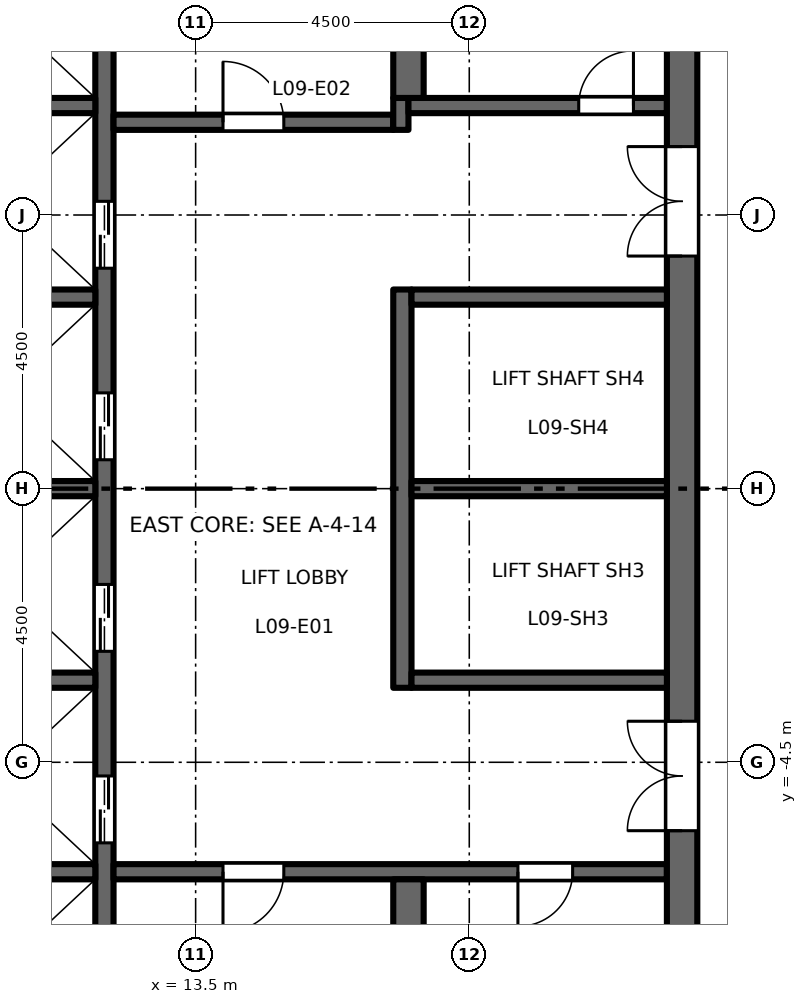
"""IFC4 building model, lengths in metres.
Left out: names, types, materials, properties, quantities, classifications, styles, units other than length and angle.
Written with IfcOpenShell. Run it as: python <this file> out.ifc"""

import sys

from ifc_helpers import new_model, si_unit, direction, frame, frame_2d, origin, place, context, subcontext, project, spatial, rectangle, extrude, element, fill, save


model = new_model("IFC4")
c1 = context("Model", 3, precision=1e-05, world=origin(), true_north=direction((0.0, 1.0)))
c2 = subcontext(c1, "Body", "Model", "MODEL_VIEW")
j1 = project(units=[si_unit("LENGTHUNIT", "METRE"), si_unit("PLANEANGLEUNIT", "RADIAN")], contexts=[c1])
p1 = place(None, origin())
s1 = spatial("IfcSite", under=j1, at=p1, CompositionType="ELEMENT")
p2 = place(p1, origin())
s2 = spatial("IfcBuilding", under=s1, at=p2, CompositionType="ELEMENT")
p3 = place(p2, frame((0.0, 0.0, 44.7)))
s3 = spatial("IfcBuildingStorey", under=s2, at=p3, CompositionType="ELEMENT", Elevation=44.7)
p4 = place(p3, frame((12.0, -9.45, 0.0), z_axis=(0.0, 0.0, 1.0), x_axis=(0.0, 1.0, 0.0)))
e1 = element("IfcWall", 1, at=p4, inside=s3, PredefinedType="SHEAR", context=c2, shape_type="SweptSolid", body=[
    extrude(rectangle(XDim=18.9, YDim=0.3, at=frame_2d((9.45, 0.0))), origin(), (0.0, 0.0, 1.0), 4.35),
])
p5 = place(p4, frame((3.625, 0.0, 0.0)))
e2 = element("IfcOpeningElement", 2, at=p5, cuts=e1, PredefinedType="OPENING", context=c2, shape_type="SweptSolid", body=[
    extrude(rectangle(XDim=1.1, YDim=2.1, at=frame_2d((0.55, 1.05))), frame((0.0, 0.16, 0.0), z_axis=(0.0, -1.0, 0.0), x_axis=(1.0, 0.0, 0.0)), (0.0, 0.0, 1.0), 0.32),
])
p6 = place(p4, frame((6.775, 0.0, 0.0)))
e3 = element("IfcOpeningElement", 3, at=p6, cuts=e1, PredefinedType="OPENING", context=c2, shape_type="SweptSolid", body=[
    extrude(rectangle(XDim=1.1, YDim=2.1, at=frame_2d((0.55, 1.05))), frame((0.0, 0.16, 0.0), z_axis=(0.0, -1.0, 0.0), x_axis=(1.0, 0.0, 0.0)), (0.0, 0.0, 1.0), 0.32),
])
p7 = place(p4, frame((9.925, 0.0, 0.0)))
e4 = element("IfcOpeningElement", 4, at=p7, cuts=e1, PredefinedType="OPENING", context=c2, shape_type="SweptSolid", body=[
    extrude(rectangle(XDim=1.1, YDim=2.1, at=frame_2d((0.55, 1.05))), frame((0.0, 0.16, 0.0), z_axis=(0.0, -1.0, 0.0), x_axis=(1.0, 0.0, 0.0)), (0.0, 0.0, 1.0), 0.32),
])
p8 = place(p4, frame((13.075, 0.0, 0.0)))
e5 = element("IfcOpeningElement", 5, at=p8, cuts=e1, PredefinedType="OPENING", context=c2, shape_type="SweptSolid", body=[
    extrude(rectangle(XDim=1.1, YDim=2.1, at=frame_2d((0.55, 1.05))), frame((0.0, 0.16, 0.0), z_axis=(0.0, -1.0, 0.0), x_axis=(1.0, 0.0, 0.0)), (0.0, 0.0, 1.0), 0.32),
])
p9 = place(p4, frame((16.725, 0.0, 0.0)))
e6 = element("IfcOpeningElement", 6, at=p9, cuts=e1, PredefinedType="OPENING", context=c2, shape_type="SweptSolid", body=[
    extrude(rectangle(XDim=1.2, YDim=2.1, at=frame_2d((0.6, 1.05))), frame((0.0, 0.16, 0.0), z_axis=(0.0, -1.0, 0.0), x_axis=(1.0, 0.0, 0.0)), (0.0, 0.0, 1.0), 0.32),
])
p10 = place(p4, frame((0.975, 0.0, 0.0)))
e7 = element("IfcOpeningElement", 7, at=p10, cuts=e1, PredefinedType="OPENING", context=c2, shape_type="SweptSolid", body=[
    extrude(rectangle(XDim=1.2, YDim=2.1, at=frame_2d((0.6, 1.05))), frame((0.0, 0.16, 0.0), z_axis=(0.0, -1.0, 0.0), x_axis=(1.0, 0.0, 0.0)), (0.0, 0.0, 1.0), 0.32),
])
p11 = place(p3, frame((12.15, 6.025, 0.0), z_axis=(0.0, 0.0, 1.0), x_axis=(1.0, 0.0, 0.0)))
e8 = element("IfcWall", 8, at=p11, inside=s3, PredefinedType="SHEAR", context=c2, shape_type="SweptSolid", body=[
    extrude(rectangle(XDim=4.6, YDim=0.25, at=frame_2d((2.3, 0.0))), origin(), (0.0, 0.0, 1.0), 4.35),
])
p12 = place(p11, frame((1.8, 0.0, 0.0)))
e9 = element("IfcOpeningElement", 9, at=p12, cuts=e8, PredefinedType="OPENING", context=c2, shape_type="SweptSolid", body=[
    extrude(rectangle(XDim=1.0, YDim=2.1, at=frame_2d((0.5, 1.05))), frame((0.0, 0.135, 0.0), z_axis=(0.0, -1.0, 0.0), x_axis=(1.0, 0.0, 0.0)), (0.0, 0.0, 1.0), 0.27),
])
p13 = place(p3, frame((16.875, 5.9, 0.0), z_axis=(0.0, 0.0, 1.0), x_axis=(0.0, 1.0, 0.0)))
e10 = element("IfcWall", 10, at=p13, inside=s3, PredefinedType="SHEAR", context=c2, shape_type="SweptSolid", body=[
    extrude(rectangle(XDim=0.525, YDim=0.25, at=frame_2d((0.263, 0.0))), origin(), (0.0, 0.0, 1.0), 4.35),
])
p14 = place(p3, frame((17.0, 6.3, 0.0), z_axis=(0.0, 0.0, 1.0), x_axis=(1.0, 0.0, 0.0)))
e11 = element("IfcWall", 11, at=p14, inside=s3, PredefinedType="SHEAR", context=c2, shape_type="SweptSolid", body=[
    extrude(rectangle(XDim=4.25, YDim=0.25, at=frame_2d((2.125, 0.0))), origin(), (0.0, 0.0, 1.0), 4.35),
])
p15 = place(p14, frame((2.8, 0.0, 0.0)))
e12 = element("IfcOpeningElement", 12, at=p15, cuts=e11, PredefinedType="OPENING", context=c2, shape_type="SweptSolid", body=[
    extrude(rectangle(XDim=0.9, YDim=2.1, at=frame_2d((0.45, 1.05))), frame((0.0, 0.135, 0.0), z_axis=(0.0, -1.0, 0.0), x_axis=(1.0, 0.0, 0.0)), (0.0, 0.0, 1.0), 0.27),
])
p16 = place(p3, frame((12.15, -6.3, 0.0), z_axis=(0.0, 0.0, 1.0), x_axis=(1.0, 0.0, 0.0)))
e13 = element("IfcWall", 13, at=p16, inside=s3, PredefinedType="SHEAR", context=c2, shape_type="SweptSolid", body=[
    extrude(rectangle(XDim=9.1, YDim=0.25, at=frame_2d((4.55, 0.0))), origin(), (0.0, 0.0, 1.0), 4.35),
])
p17 = place(p16, frame((1.8, 0.0, 0.0)))
e14 = element("IfcOpeningElement", 14, at=p17, cuts=e13, PredefinedType="OPENING", context=c2, shape_type="SweptSolid", body=[
    extrude(rectangle(XDim=1.0, YDim=2.1, at=frame_2d((0.5, 1.05))), frame((0.0, 0.135, 0.0), z_axis=(0.0, -1.0, 0.0), x_axis=(1.0, 0.0, 0.0)), (0.0, 0.0, 1.0), 0.27),
])
p18 = place(p16, frame((6.65, 0.0, 0.0)))
e15 = element("IfcOpeningElement", 15, at=p18, cuts=e13, PredefinedType="OPENING", context=c2, shape_type="SweptSolid", body=[
    extrude(rectangle(XDim=0.9, YDim=2.1, at=frame_2d((0.45, 1.05))), frame((0.0, 0.135, 0.0), z_axis=(0.0, -1.0, 0.0), x_axis=(1.0, 0.0, 0.0)), (0.0, 0.0, 1.0), 0.27),
])
p19 = place(p3, frame((21.5, -13.0, 0.0), z_axis=(0.0, 0.0, 1.0), x_axis=(0.0, 1.0, 0.0)))
e16 = element("IfcWall", 16, at=p19, inside=s3, PredefinedType="SHEAR", context=c2, shape_type="SweptSolid", body=[
    extrude(rectangle(XDim=26.0, YDim=0.5, at=frame_2d((13.0, 0.0))), origin(), (0.0, 0.0, 1.0), 4.35),
])
p20 = place(p19, frame((16.825, 0.0, 0.0)))
e17 = element("IfcOpeningElement", 17, at=p20, cuts=e16, PredefinedType="OPENING", context=c2, shape_type="SweptSolid", body=[
    extrude(rectangle(XDim=1.8, YDim=2.1, at=frame_2d((0.9, 1.05))), frame((0.0, 0.26, 0.0), z_axis=(0.0, -1.0, 0.0), x_axis=(1.0, 0.0, 0.0)), (0.0, 0.0, 1.0), 0.52),
])
p21 = place(p19, frame((7.375, 0.0, 0.0)))
e18 = element("IfcOpeningElement", 18, at=p21, cuts=e16, PredefinedType="OPENING", context=c2, shape_type="SweptSolid", body=[
    extrude(rectangle(XDim=1.8, YDim=2.1, at=frame_2d((0.9, 1.05))), frame((0.0, 0.26, 0.0), z_axis=(0.0, -1.0, 0.0), x_axis=(1.0, 0.0, 0.0)), (0.0, 0.0, 1.0), 0.52),
])
p22 = place(p19, frame((1.3, 0.0, 0.0)))
e19 = element("IfcOpeningElement", 19, at=p22, cuts=e16, PredefinedType="OPENING", context=c2, shape_type="SweptSolid", body=[
    extrude(rectangle(XDim=0.9, YDim=2.1, at=frame_2d((0.45, 1.05))), frame((0.0, 0.26, 0.0), z_axis=(0.0, -1.0, 0.0), x_axis=(1.0, 0.0, 0.0)), (0.0, 0.0, 1.0), 0.52),
])
p23 = place(p3, frame((16.9, -3.275, 0.0), z_axis=(0.0, 0.0, 1.0), x_axis=(0.0, 1.0, 0.0)))
e20 = element("IfcWall", 20, at=p23, inside=s3, PredefinedType="SHEAR", context=c2, shape_type="SweptSolid", body=[
    extrude(rectangle(XDim=6.55, YDim=0.3, at=frame_2d((3.275, 0.0))), origin(), (0.0, 0.0, 1.0), 4.35),
])
for number, where, z_axis, x_axis in (
    (21, (17.05, 0.0, 0.0), (0.0, 0.0, 1.0), (1.0, 0.0, 0.0)),
    (22, (17.05, 3.15, 0.0), (0.0, 0.0, 1.0), (1.0, 0.0, 0.0)),
    (23, (17.05, -3.15, 0.0), (0.0, 0.0, 1.0), (1.0, 0.0, 0.0)),
):
    element("IfcWall", number, at=place(p3, frame(where, z_axis=z_axis, x_axis=x_axis)), inside=s3, PredefinedType="SHEAR", context=c2, shape_type="SweptSolid", body=[
        extrude(rectangle(XDim=4.2, YDim=0.25, at=frame_2d((2.1, 0.0))), origin(), (0.0, 0.0, 1.0), 4.35),
    ])
for number, where, z_axis, x_axis in (
    (24, (17.0, 6.425, 0.0), (0.0, 0.0, 1.0), (0.0, 1.0, 0.0)),
    (25, (17.0, -13.0, 0.0), (0.0, 0.0, 1.0), (0.0, 1.0, 0.0)),
):
    element("IfcWall", number, at=place(p3, frame(where, z_axis=z_axis, x_axis=x_axis)), inside=s3, PredefinedType="SHEAR", context=c2, shape_type="SweptSolid", body=[
        extrude(rectangle(XDim=6.575, YDim=0.5, at=frame_2d((3.288, 0.0))), origin(), (0.0, 0.0, 1.0), 4.35),
    ])
for number, where, z_axis, x_axis in (
    (26, (8.75, 0.0, 0.0), (0.0, 0.0, 1.0), (1.0, 0.0, 0.0)),
    (27, (8.75, 3.15, 0.0), (0.0, 0.0, 1.0), (1.0, 0.0, 0.0)),
    (28, (8.75, 6.3, 0.0), (0.0, 0.0, 1.0), (1.0, 0.0, 0.0)),
    (29, (8.75, -3.15, 0.0), (0.0, 0.0, 1.0), (1.0, 0.0, 0.0)),
    (30, (8.75, -6.3, 0.0), (0.0, 0.0, 1.0), (1.0, 0.0, 0.0)),
):
    element("IfcWall", number, at=place(p3, frame(where, z_axis=z_axis, x_axis=x_axis)), inside=s3, PredefinedType="SHEAR", context=c2, shape_type="SweptSolid", body=[
        extrude(rectangle(XDim=3.1, YDim=0.25, at=frame_2d((1.55, 0.0))), origin(), (0.0, 0.0, 1.0), 4.35),
    ])
p24 = place(p12, origin())
e31 = element("IfcDoor", 31, at=p24, inside=s3, OperationType="SINGLE_SWING_RIGHT", PredefinedType="DOOR", context=c2, shape_type="SweptSolid", body=[
    extrude(rectangle(XDim=1.0, YDim=2.1, at=frame_2d((0.5, 1.05))), frame((0.0, 0.025, 0.0), z_axis=(0.0, -1.0, 0.0), x_axis=(1.0, 0.0, 0.0)), (0.0, 0.0, 1.0), 0.05),
])
fill(e9, e31)
p25 = place(p17, origin())
e32 = element("IfcDoor", 32, at=p25, inside=s3, OperationType="SINGLE_SWING_LEFT", PredefinedType="DOOR", context=c2, shape_type="SweptSolid", body=[
    extrude(rectangle(XDim=1.0, YDim=2.1, at=frame_2d((0.5, 1.05))), frame((0.0, 0.025, 0.0), z_axis=(0.0, -1.0, 0.0), x_axis=(1.0, 0.0, 0.0)), (0.0, 0.0, 1.0), 0.05),
])
fill(e14, e32)
p26 = place(p20, origin())
e33 = element("IfcDoor", 33, at=p26, inside=s3, OperationType="DOUBLE_DOOR_DOUBLE_SWING", PredefinedType="DOOR", context=c2, shape_type="SweptSolid", body=[
    extrude(rectangle(XDim=1.8, YDim=2.1, at=frame_2d((0.9, 1.05))), frame((0.0, 0.025, 0.0), z_axis=(0.0, -1.0, 0.0), x_axis=(1.0, 0.0, 0.0)), (0.0, 0.0, 1.0), 0.05),
])
fill(e17, e33)
p27 = place(p21, origin())
e34 = element("IfcDoor", 34, at=p27, inside=s3, OperationType="DOUBLE_DOOR_DOUBLE_SWING", PredefinedType="DOOR", context=c2, shape_type="SweptSolid", body=[
    extrude(rectangle(XDim=1.8, YDim=2.1, at=frame_2d((0.9, 1.05))), frame((0.0, 0.025, 0.0), z_axis=(0.0, -1.0, 0.0), x_axis=(1.0, 0.0, 0.0)), (0.0, 0.0, 1.0), 0.05),
])
fill(e18, e34)
p28 = place(p5, origin())
e35 = element("IfcDoor", 35, at=p28, inside=s3, OperationType="DOUBLE_DOOR_SLIDING", PredefinedType="DOOR", context=c2, shape_type="SweptSolid", body=[
    extrude(rectangle(XDim=1.1, YDim=2.1, at=frame_2d((0.55, 1.05))), frame((0.0, 0.025, 0.0), z_axis=(0.0, -1.0, 0.0), x_axis=(1.0, 0.0, 0.0)), (0.0, 0.0, 1.0), 0.05),
])
fill(e2, e35)
p29 = place(p6, origin())
e36 = element("IfcDoor", 36, at=p29, inside=s3, OperationType="DOUBLE_DOOR_SLIDING", PredefinedType="DOOR", context=c2, shape_type="SweptSolid", body=[
    extrude(rectangle(XDim=1.1, YDim=2.1, at=frame_2d((0.55, 1.05))), frame((0.0, 0.025, 0.0), z_axis=(0.0, -1.0, 0.0), x_axis=(1.0, 0.0, 0.0)), (0.0, 0.0, 1.0), 0.05),
])
fill(e3, e36)
p30 = place(p7, origin())
e37 = element("IfcDoor", 37, at=p30, inside=s3, OperationType="DOUBLE_DOOR_SLIDING", PredefinedType="DOOR", context=c2, shape_type="SweptSolid", body=[
    extrude(rectangle(XDim=1.1, YDim=2.1, at=frame_2d((0.55, 1.05))), frame((0.0, 0.025, 0.0), z_axis=(0.0, -1.0, 0.0), x_axis=(1.0, 0.0, 0.0)), (0.0, 0.0, 1.0), 0.05),
])
fill(e4, e37)
p31 = place(p8, origin())
e38 = element("IfcDoor", 38, at=p31, inside=s3, OperationType="DOUBLE_DOOR_SLIDING", PredefinedType="DOOR", context=c2, shape_type="SweptSolid", body=[
    extrude(rectangle(XDim=1.1, YDim=2.1, at=frame_2d((0.55, 1.05))), frame((0.0, 0.025, 0.0), z_axis=(0.0, -1.0, 0.0), x_axis=(1.0, 0.0, 0.0)), (0.0, 0.0, 1.0), 0.05),
])
fill(e5, e38)
p32 = place(p15, origin())
e39 = element("IfcDoor", 39, at=p32, inside=s3, OperationType="SINGLE_SWING_LEFT", PredefinedType="DOOR", context=c2, shape_type="SweptSolid", body=[
    extrude(rectangle(XDim=0.9, YDim=2.1, at=frame_2d((0.45, 1.05))), frame((0.0, 0.025, 0.0), z_axis=(0.0, -1.0, 0.0), x_axis=(1.0, 0.0, 0.0)), (0.0, 0.0, 1.0), 0.05),
])
fill(e12, e39)
p33 = place(p18, origin())
e40 = element("IfcDoor", 40, at=p33, inside=s3, OperationType="SINGLE_SWING_LEFT", PredefinedType="DOOR", context=c2, shape_type="SweptSolid", body=[
    extrude(rectangle(XDim=0.9, YDim=2.1, at=frame_2d((0.45, 1.05))), frame((0.0, 0.025, 0.0), z_axis=(0.0, -1.0, 0.0), x_axis=(1.0, 0.0, 0.0)), (0.0, 0.0, 1.0), 0.05),
])
fill(e15, e40)
save(model, sys.argv[1])
